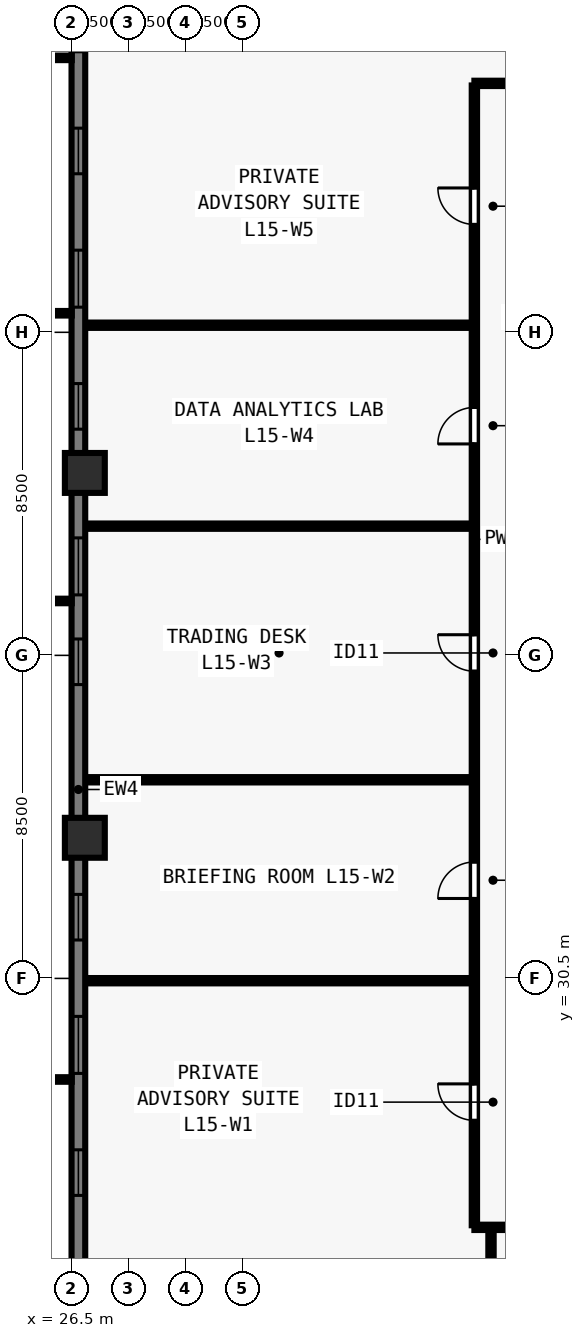
"""IFC4 building model, lengths in metres.
Left out: names, types, materials, properties, quantities, classifications, styles, units other than length and angle.
Written with IfcOpenShell. Run it as: python <this file> out.ifc"""

import sys

from ifc_helpers import new_model, si_unit, direction, frame, frame_2d, origin, origin_2d, place, context, subcontext, project, spatial, rectangle, extrude, element, fill, save


model = new_model("IFC4")
c1 = context("Model", 3, precision=1e-05, world=origin(), true_north=direction((0.0, 1.0)))
c2 = subcontext(c1, "Body", "Model", "MODEL_VIEW")
j1 = project(units=[si_unit("LENGTHUNIT", "METRE"), si_unit("PLANEANGLEUNIT", "RADIAN")], contexts=[c1])
p1 = place(None, origin())
s1 = spatial("IfcSite", under=j1, at=p1, CompositionType="ELEMENT")
p2 = place(p1, origin())
s2 = spatial("IfcBuilding", under=s1, at=p2, CompositionType="ELEMENT")
p3 = place(p2, frame((0.0, 0.0, 58.5)))
s3 = spatial("IfcBuildingStorey", under=s2, at=p3, CompositionType="ELEMENT", Elevation=58.5)
for number, where, z_axis, x_axis in (
    (1, (26.85, 43.8, 0.0), (0.0, 0.0, 1.0), (0.0, 1.0, 0.0)),
    (2, (26.85, 34.2, 0.0), (0.0, 0.0, 1.0), (0.0, 1.0, 0.0)),
):
    element("IfcColumn", number, at=place(p3, frame(where, z_axis=z_axis, x_axis=x_axis)), inside=s3, PredefinedType="COLUMN", context=c2, shape_type="SweptSolid", body=[
        extrude(rectangle(XDim=1.05, YDim=1.05, at=origin_2d()), origin(), (0.0, 0.0, 1.0), 3.5),
    ])
p4 = place(p3, frame((26.68, 16.5, 0.0), z_axis=(0.0, 0.0, 1.0), x_axis=(0.0, 1.0, 0.0)))
e3 = element("IfcWall", 3, at=p4, inside=s3, PredefinedType="SOLIDWALL", context=c2, shape_type="SweptSolid", body=[
    extrude(rectangle(XDim=44.662, YDim=0.36, at=frame_2d((22.331, 0.0))), origin(), (0.0, 0.0, 1.0), 3.28),
])
p5 = place(p4, frame((4.78, 0.0, 0.8)))
e4 = element("IfcOpeningElement", 4, at=p5, cuts=e3, PredefinedType="OPENING", context=c2, shape_type="SweptSolid", body=[
    extrude(rectangle(XDim=1.5, YDim=1.544, at=frame_2d((0.75, 0.772))), frame((0.0, 0.19, 0.0), z_axis=(0.0, -1.0, 0.0), x_axis=(1.0, 0.0, 0.0)), (0.0, 0.0, 1.0), 0.38),
])
p6 = place(p4, frame((8.29, 0.0, 0.8)))
e5 = element("IfcOpeningElement", 5, at=p6, cuts=e3, PredefinedType="OPENING", context=c2, shape_type="SweptSolid", body=[
    extrude(rectangle(XDim=1.2, YDim=1.544, at=frame_2d((0.6, 0.772))), frame((0.0, 0.19, 0.0), z_axis=(0.0, -1.0, 0.0), x_axis=(1.0, 0.0, 0.0)), (0.0, 0.0, 1.0), 0.38),
])
p7 = place(p4, frame((11.5, 0.0, 0.8)))
e6 = element("IfcOpeningElement", 6, at=p7, cuts=e3, PredefinedType="OPENING", context=c2, shape_type="SweptSolid", body=[
    extrude(rectangle(XDim=1.5, YDim=1.544, at=frame_2d((0.75, 0.772))), frame((0.0, 0.19, 0.0), z_axis=(0.0, -1.0, 0.0), x_axis=(1.0, 0.0, 0.0)), (0.0, 0.0, 1.0), 0.38),
])
p8 = place(p4, frame((15.01, 0.0, 0.8)))
e7 = element("IfcOpeningElement", 7, at=p8, cuts=e3, PredefinedType="OPENING", context=c2, shape_type="SweptSolid", body=[
    extrude(rectangle(XDim=1.2, YDim=1.544, at=frame_2d((0.6, 0.772))), frame((0.0, 0.19, 0.0), z_axis=(0.0, -1.0, 0.0), x_axis=(1.0, 0.0, 0.0)), (0.0, 0.0, 1.0), 0.38),
])
p9 = place(p4, frame((21.731, 0.0, 0.8)))
e8 = element("IfcOpeningElement", 8, at=p9, cuts=e3, PredefinedType="OPENING", context=c2, shape_type="SweptSolid", body=[
    extrude(rectangle(XDim=1.2, YDim=1.544, at=frame_2d((0.6, 0.772))), frame((0.0, 0.19, 0.0), z_axis=(0.0, -1.0, 0.0), x_axis=(1.0, 0.0, 0.0)), (0.0, 0.0, 1.0), 0.38),
])
p10 = place(p4, frame((24.091, 0.0, 0.8)))
e9 = element("IfcOpeningElement", 9, at=p10, cuts=e3, PredefinedType="OPENING", context=c2, shape_type="SweptSolid", body=[
    extrude(rectangle(XDim=1.5, YDim=1.544, at=frame_2d((0.75, 0.772))), frame((0.0, 0.19, 0.0), z_axis=(0.0, -1.0, 0.0), x_axis=(1.0, 0.0, 0.0)), (0.0, 0.0, 1.0), 0.38),
])
p11 = place(p4, frame((28.451, 0.0, 0.8)))
e10 = element("IfcOpeningElement", 10, at=p11, cuts=e3, PredefinedType="OPENING", context=c2, shape_type="SweptSolid", body=[
    extrude(rectangle(XDim=1.2, YDim=1.544, at=frame_2d((0.6, 0.772))), frame((0.0, 0.19, 0.0), z_axis=(0.0, -1.0, 0.0), x_axis=(1.0, 0.0, 0.0)), (0.0, 0.0, 1.0), 0.38),
])
p12 = place(p4, frame((31.662, 0.0, 0.8)))
e11 = element("IfcOpeningElement", 11, at=p12, cuts=e3, PredefinedType="OPENING", context=c2, shape_type="SweptSolid", body=[
    extrude(rectangle(XDim=1.5, YDim=1.544, at=frame_2d((0.75, 0.772))), frame((0.0, 0.19, 0.0), z_axis=(0.0, -1.0, 0.0), x_axis=(1.0, 0.0, 0.0)), (0.0, 0.0, 1.0), 0.38),
])
p13 = place(p4, frame((35.172, 0.0, 0.8)))
e12 = element("IfcOpeningElement", 12, at=p13, cuts=e3, PredefinedType="OPENING", context=c2, shape_type="SweptSolid", body=[
    extrude(rectangle(XDim=1.2, YDim=1.544, at=frame_2d((0.6, 0.772))), frame((0.0, 0.19, 0.0), z_axis=(0.0, -1.0, 0.0), x_axis=(1.0, 0.0, 0.0)), (0.0, 0.0, 1.0), 0.38),
])
p14 = place(p4, frame((38.382, 0.0, 0.8)))
e13 = element("IfcOpeningElement", 13, at=p14, cuts=e3, PredefinedType="OPENING", context=c2, shape_type="SweptSolid", body=[
    extrude(rectangle(XDim=1.5, YDim=1.544, at=frame_2d((0.75, 0.772))), frame((0.0, 0.19, 0.0), z_axis=(0.0, -1.0, 0.0), x_axis=(1.0, 0.0, 0.0)), (0.0, 0.0, 1.0), 0.38),
])
p15 = place(p3, frame((37.1, 23.95, 0.0), z_axis=(0.0, 0.0, 1.0), x_axis=(1.0, 0.0, 0.0)))
e14 = element("IfcWall", 14, at=p15, inside=s3, PredefinedType="PARTITIONING", context=c2, shape_type="SweptSolid", body=[
    extrude(rectangle(XDim=29.8, YDim=0.14, at=frame_2d((14.9, 0.0))), origin(), (0.0, 0.0, 1.0), 3.28),
])
p16 = place(p15, frame((4.191, 0.0, 0.0)))
e15 = element("IfcOpeningElement", 15, at=p16, cuts=e14, PredefinedType="OPENING", context=c2, shape_type="SweptSolid", body=[
    extrude(rectangle(XDim=0.96, YDim=2.12, at=frame_2d((0.48, 1.06))), frame((0.0, 0.08, 0.0), z_axis=(0.0, -1.0, 0.0), x_axis=(1.0, 0.0, 0.0)), (0.0, 0.0, 1.0), 0.16),
])
p17 = place(p15, frame((5.358, 0.0, 0.0)))
e16 = element("IfcOpeningElement", 16, at=p17, cuts=e14, PredefinedType="OPENING", context=c2, shape_type="SweptSolid", body=[
    extrude(rectangle(XDim=0.96, YDim=2.12, at=frame_2d((0.48, 1.06))), frame((0.0, 0.08, 0.0), z_axis=(0.0, -1.0, 0.0), x_axis=(1.0, 0.0, 0.0)), (0.0, 0.0, 1.0), 0.16),
])
p18 = place(p15, frame((14.51, 0.0, 0.0)))
e17 = element("IfcOpeningElement", 17, at=p18, cuts=e14, PredefinedType="OPENING", context=c2, shape_type="SweptSolid", body=[
    extrude(rectangle(XDim=0.96, YDim=2.12, at=frame_2d((0.48, 1.06))), frame((0.0, 0.08, 0.0), z_axis=(0.0, -1.0, 0.0), x_axis=(1.0, 0.0, 0.0)), (0.0, 0.0, 1.0), 0.16),
])
p19 = place(p15, frame((24.542, 0.0, 0.0)))
e18 = element("IfcOpeningElement", 18, at=p19, cuts=e14, PredefinedType="OPENING", context=c2, shape_type="SweptSolid", body=[
    extrude(rectangle(XDim=0.96, YDim=2.12, at=frame_2d((0.48, 1.06))), frame((0.0, 0.08, 0.0), z_axis=(0.0, -1.0, 0.0), x_axis=(1.0, 0.0, 0.0)), (0.0, 0.0, 1.0), 0.16),
])
p20 = place(p15, frame((28.26, 0.0, 0.0)))
e19 = element("IfcOpeningElement", 19, at=p20, cuts=e14, PredefinedType="OPENING", context=c2, shape_type="SweptSolid", body=[
    extrude(rectangle(XDim=0.96, YDim=2.12, at=frame_2d((0.48, 1.06))), frame((0.0, 0.08, 0.0), z_axis=(0.0, -1.0, 0.0), x_axis=(1.0, 0.0, 0.0)), (0.0, 0.0, 1.0), 0.16),
])
p21 = place(p3, frame((37.1, 54.05, 0.0), z_axis=(0.0, 0.0, 1.0), x_axis=(1.0, 0.0, 0.0)))
e20 = element("IfcWall", 20, at=p21, inside=s3, PredefinedType="PARTITIONING", context=c2, shape_type="SweptSolid", body=[
    extrude(rectangle(XDim=29.8, YDim=0.14, at=frame_2d((14.9, 0.0))), origin(), (0.0, 0.0, 1.0), 3.28),
])
p22 = place(p21, frame((3.522, 0.0, 0.0)))
e21 = element("IfcOpeningElement", 21, at=p22, cuts=e20, PredefinedType="OPENING", context=c2, shape_type="SweptSolid", body=[
    extrude(rectangle(XDim=0.96, YDim=2.12, at=frame_2d((0.48, 1.06))), frame((0.0, 0.08, 0.0), z_axis=(0.0, -1.0, 0.0), x_axis=(1.0, 0.0, 0.0)), (0.0, 0.0, 1.0), 0.16),
])
p23 = place(p21, frame((8.06, 0.0, 0.0)))
e22 = element("IfcOpeningElement", 22, at=p23, cuts=e20, PredefinedType="OPENING", context=c2, shape_type="SweptSolid", body=[
    extrude(rectangle(XDim=0.96, YDim=2.12, at=frame_2d((0.48, 1.06))), frame((0.0, 0.08, 0.0), z_axis=(0.0, -1.0, 0.0), x_axis=(1.0, 0.0, 0.0)), (0.0, 0.0, 1.0), 0.16),
])
p24 = place(p21, frame((20.6, 0.0, 0.0)))
e23 = element("IfcOpeningElement", 23, at=p24, cuts=e20, PredefinedType="OPENING", context=c2, shape_type="SweptSolid", body=[
    extrude(rectangle(XDim=0.96, YDim=2.12, at=frame_2d((0.48, 1.06))), frame((0.0, 0.08, 0.0), z_axis=(0.0, -1.0, 0.0), x_axis=(1.0, 0.0, 0.0)), (0.0, 0.0, 1.0), 0.16),
])
p25 = place(p21, frame((28.48, 0.0, 0.0)))
e24 = element("IfcOpeningElement", 24, at=p25, cuts=e20, PredefinedType="OPENING", context=c2, shape_type="SweptSolid", body=[
    extrude(rectangle(XDim=0.96, YDim=2.12, at=frame_2d((0.48, 1.06))), frame((0.0, 0.08, 0.0), z_axis=(0.0, -1.0, 0.0), x_axis=(1.0, 0.0, 0.0)), (0.0, 0.0, 1.0), 0.16),
])
p26 = place(p3, frame((37.1, 24.005, 0.0), z_axis=(0.0, 0.0, 1.0), x_axis=(0.0, 1.0, 0.0)))
e25 = element("IfcWall", 25, at=p26, inside=s3, PredefinedType="PARTITIONING", context=c2, shape_type="SweptSolid", body=[
    extrude(rectangle(XDim=29.99, YDim=0.14, at=frame_2d((14.995, 0.0))), origin(), (0.0, 0.0, 1.0), 3.28),
])
p27 = place(p26, frame((2.76, 0.0, 0.0)))
e26 = element("IfcOpeningElement", 26, at=p27, cuts=e25, PredefinedType="OPENING", context=c2, shape_type="SweptSolid", body=[
    extrude(rectangle(XDim=0.96, YDim=2.12, at=frame_2d((0.48, 1.06))), frame((0.0, 0.08, 0.0), z_axis=(0.0, -1.0, 0.0), x_axis=(1.0, 0.0, 0.0)), (0.0, 0.0, 1.0), 0.16),
])
p28 = place(p26, frame((8.598, 0.0, 0.0)))
e27 = element("IfcOpeningElement", 27, at=p28, cuts=e25, PredefinedType="OPENING", context=c2, shape_type="SweptSolid", body=[
    extrude(rectangle(XDim=0.96, YDim=2.12, at=frame_2d((0.48, 1.06))), frame((0.0, 0.08, 0.0), z_axis=(0.0, -1.0, 0.0), x_axis=(1.0, 0.0, 0.0)), (0.0, 0.0, 1.0), 0.16),
])
p29 = place(p26, frame((14.578, 0.0, 0.0)))
e28 = element("IfcOpeningElement", 28, at=p29, cuts=e25, PredefinedType="OPENING", context=c2, shape_type="SweptSolid", body=[
    extrude(rectangle(XDim=0.96, YDim=2.12, at=frame_2d((0.48, 1.06))), frame((0.0, 0.08, 0.0), z_axis=(0.0, -1.0, 0.0), x_axis=(1.0, 0.0, 0.0)), (0.0, 0.0, 1.0), 0.16),
])
p30 = place(p26, frame((20.558, 0.0, 0.0)))
e29 = element("IfcOpeningElement", 29, at=p30, cuts=e25, PredefinedType="OPENING", context=c2, shape_type="SweptSolid", body=[
    extrude(rectangle(XDim=0.96, YDim=2.12, at=frame_2d((0.48, 1.06))), frame((0.0, 0.08, 0.0), z_axis=(0.0, -1.0, 0.0), x_axis=(1.0, 0.0, 0.0)), (0.0, 0.0, 1.0), 0.16),
])
p31 = place(p26, frame((26.333, 0.0, 0.0)))
e30 = element("IfcOpeningElement", 30, at=p31, cuts=e25, PredefinedType="OPENING", context=c2, shape_type="SweptSolid", body=[
    extrude(rectangle(XDim=0.96, YDim=2.12, at=frame_2d((0.48, 1.06))), frame((0.0, 0.08, 0.0), z_axis=(0.0, -1.0, 0.0), x_axis=(1.0, 0.0, 0.0)), (0.0, 0.0, 1.0), 0.16),
])
p32 = place(p3, frame((37.537, 13.92, 0.0), z_axis=(0.0, 0.0, 1.0), x_axis=(0.0, 1.0, 0.0)))
e31 = element("IfcWall", 31, at=p32, inside=s3, PredefinedType="PARTITIONING", context=c2, shape_type="SweptSolid", body=[
    extrude(rectangle(XDim=9.93, YDim=0.14, at=frame_2d((4.965, 0.0))), origin(), (0.0, 0.0, 1.0), 2.439),
])
p33 = place(p3, frame((26.92, 30.439, 0.0), z_axis=(0.0, 0.0, 1.0), x_axis=(1.0, 0.0, 0.0)))
e32 = element("IfcWall", 32, at=p33, inside=s3, PredefinedType="PARTITIONING", context=c2, shape_type="SweptSolid", body=[
    extrude(rectangle(XDim=10.08, YDim=0.14, at=frame_2d((5.04, 0.0))), origin(), (0.0, 0.0, 1.0), 3.28),
])
p34 = place(p3, frame((26.92, 35.727, 0.0), z_axis=(0.0, 0.0, 1.0), x_axis=(1.0, 0.0, 0.0)))
e33 = element("IfcWall", 33, at=p34, inside=s3, PredefinedType="PARTITIONING", context=c2, shape_type="SweptSolid", body=[
    extrude(rectangle(XDim=10.08, YDim=0.14, at=frame_2d((5.04, 0.0))), origin(), (0.0, 0.0, 1.0), 2.849),
])
for number, where, z_axis, x_axis in (
    (34, (26.92, 42.399, 0.0), (0.0, 0.0, 1.0), (1.0, 0.0, 0.0)),
    (35, (26.92, 47.687, 0.0), (0.0, 0.0, 1.0), (1.0, 0.0, 0.0)),
):
    element("IfcWall", number, at=place(p3, frame(where, z_axis=z_axis, x_axis=x_axis)), inside=s3, PredefinedType="PARTITIONING", context=c2, shape_type="SweptSolid", body=[
        extrude(rectangle(XDim=10.08, YDim=0.14, at=frame_2d((5.04, 0.0))), origin(), (0.0, 0.0, 1.0), 3.28),
    ])
p35 = place(p6, origin())
e36 = element("IfcWindow", 36, at=p35, inside=s3, PartitioningType="SINGLE_PANEL", PredefinedType="WINDOW", context=c2, shape_type="SweptSolid", body=[
    extrude(rectangle(XDim=1.2, YDim=1.544, at=frame_2d((0.6, 0.772))), frame((0.0, -0.05, 0.0), z_axis=(0.0, -1.0, 0.0), x_axis=(1.0, 0.0, 0.0)), (0.0, 0.0, 1.0), 0.06),
])
fill(e5, e36)
p36 = place(p7, origin())
e37 = element("IfcWindow", 37, at=p36, inside=s3, PartitioningType="SINGLE_PANEL", PredefinedType="WINDOW", context=c2, shape_type="SweptSolid", body=[
    extrude(rectangle(XDim=1.5, YDim=1.544, at=frame_2d((0.75, 0.772))), frame((0.0, -0.05, 0.0), z_axis=(0.0, -1.0, 0.0), x_axis=(1.0, 0.0, 0.0)), (0.0, 0.0, 1.0), 0.06),
])
fill(e6, e37)
p37 = place(p8, origin())
e38 = element("IfcWindow", 38, at=p37, inside=s3, PartitioningType="SINGLE_PANEL", PredefinedType="WINDOW", context=c2, shape_type="SweptSolid", body=[
    extrude(rectangle(XDim=1.2, YDim=1.544, at=frame_2d((0.6, 0.772))), frame((0.0, -0.05, 0.0), z_axis=(0.0, -1.0, 0.0), x_axis=(1.0, 0.0, 0.0)), (0.0, 0.0, 1.0), 0.06),
])
fill(e7, e38)
p38 = place(p9, origin())
e39 = element("IfcWindow", 39, at=p38, inside=s3, PartitioningType="SINGLE_PANEL", PredefinedType="WINDOW", context=c2, shape_type="SweptSolid", body=[
    extrude(rectangle(XDim=1.2, YDim=1.544, at=frame_2d((0.6, 0.772))), frame((0.0, -0.05, 0.0), z_axis=(0.0, -1.0, 0.0), x_axis=(1.0, 0.0, 0.0)), (0.0, 0.0, 1.0), 0.06),
])
fill(e8, e39)
p39 = place(p10, origin())
e40 = element("IfcWindow", 40, at=p39, inside=s3, PartitioningType="SINGLE_PANEL", PredefinedType="WINDOW", context=c2, shape_type="SweptSolid", body=[
    extrude(rectangle(XDim=1.5, YDim=1.544, at=frame_2d((0.75, 0.772))), frame((0.0, -0.05, 0.0), z_axis=(0.0, -1.0, 0.0), x_axis=(1.0, 0.0, 0.0)), (0.0, 0.0, 1.0), 0.06),
])
fill(e9, e40)
p40 = place(p11, origin())
e41 = element("IfcWindow", 41, at=p40, inside=s3, PartitioningType="SINGLE_PANEL", PredefinedType="WINDOW", context=c2, shape_type="SweptSolid", body=[
    extrude(rectangle(XDim=1.2, YDim=1.544, at=frame_2d((0.6, 0.772))), frame((0.0, -0.05, 0.0), z_axis=(0.0, -1.0, 0.0), x_axis=(1.0, 0.0, 0.0)), (0.0, 0.0, 1.0), 0.06),
])
fill(e10, e41)
p41 = place(p12, origin())
e42 = element("IfcWindow", 42, at=p41, inside=s3, PartitioningType="SINGLE_PANEL", PredefinedType="WINDOW", context=c2, shape_type="SweptSolid", body=[
    extrude(rectangle(XDim=1.5, YDim=1.544, at=frame_2d((0.75, 0.772))), frame((0.0, -0.05, 0.0), z_axis=(0.0, -1.0, 0.0), x_axis=(1.0, 0.0, 0.0)), (0.0, 0.0, 1.0), 0.06),
])
fill(e11, e42)
p42 = place(p13, origin())
e43 = element("IfcWindow", 43, at=p42, inside=s3, PartitioningType="SINGLE_PANEL", PredefinedType="WINDOW", context=c2, shape_type="SweptSolid", body=[
    extrude(rectangle(XDim=1.2, YDim=1.544, at=frame_2d((0.6, 0.772))), frame((0.0, -0.05, 0.0), z_axis=(0.0, -1.0, 0.0), x_axis=(1.0, 0.0, 0.0)), (0.0, 0.0, 1.0), 0.06),
])
fill(e12, e43)
p43 = place(p27, origin())
e44 = element("IfcDoor", 44, at=p43, inside=s3, OperationType="SINGLE_SWING_RIGHT", PredefinedType="DOOR", context=c2, shape_type="SweptSolid", body=[
    extrude(rectangle(XDim=0.96, YDim=2.12, at=frame_2d((0.48, 1.06))), frame((0.0, 0.025, 0.0), z_axis=(0.0, -1.0, 0.0), x_axis=(1.0, 0.0, 0.0)), (0.0, 0.0, 1.0), 0.05),
])
fill(e26, e44)
p44 = place(p28, origin())
e45 = element("IfcDoor", 45, at=p44, inside=s3, OperationType="SINGLE_SWING_LEFT", PredefinedType="DOOR", context=c2, shape_type="SweptSolid", body=[
    extrude(rectangle(XDim=0.96, YDim=2.12, at=frame_2d((0.48, 1.06))), frame((0.0, 0.025, 0.0), z_axis=(0.0, -1.0, 0.0), x_axis=(1.0, 0.0, 0.0)), (0.0, 0.0, 1.0), 0.05),
])
fill(e27, e45)
p45 = place(p29, origin())
e46 = element("IfcDoor", 46, at=p45, inside=s3, OperationType="SINGLE_SWING_RIGHT", PredefinedType="DOOR", context=c2, shape_type="SweptSolid", body=[
    extrude(rectangle(XDim=0.96, YDim=2.12, at=frame_2d((0.48, 1.06))), frame((0.0, 0.025, 0.0), z_axis=(0.0, -1.0, 0.0), x_axis=(1.0, 0.0, 0.0)), (0.0, 0.0, 1.0), 0.05),
])
fill(e28, e46)
p46 = place(p30, origin())
e47 = element("IfcDoor", 47, at=p46, inside=s3, OperationType="SINGLE_SWING_LEFT", PredefinedType="DOOR", context=c2, shape_type="SweptSolid", body=[
    extrude(rectangle(XDim=0.96, YDim=2.12, at=frame_2d((0.48, 1.06))), frame((0.0, 0.025, 0.0), z_axis=(0.0, -1.0, 0.0), x_axis=(1.0, 0.0, 0.0)), (0.0, 0.0, 1.0), 0.05),
])
fill(e29, e47)
p47 = place(p31, origin())
e48 = element("IfcDoor", 48, at=p47, inside=s3, OperationType="SINGLE_SWING_RIGHT", PredefinedType="DOOR", context=c2, shape_type="SweptSolid", body=[
    extrude(rectangle(XDim=0.96, YDim=2.12, at=frame_2d((0.48, 1.06))), frame((0.0, 0.025, 0.0), z_axis=(0.0, -1.0, 0.0), x_axis=(1.0, 0.0, 0.0)), (0.0, 0.0, 1.0), 0.05),
])
fill(e30, e48)
save(model, sys.argv[1])
